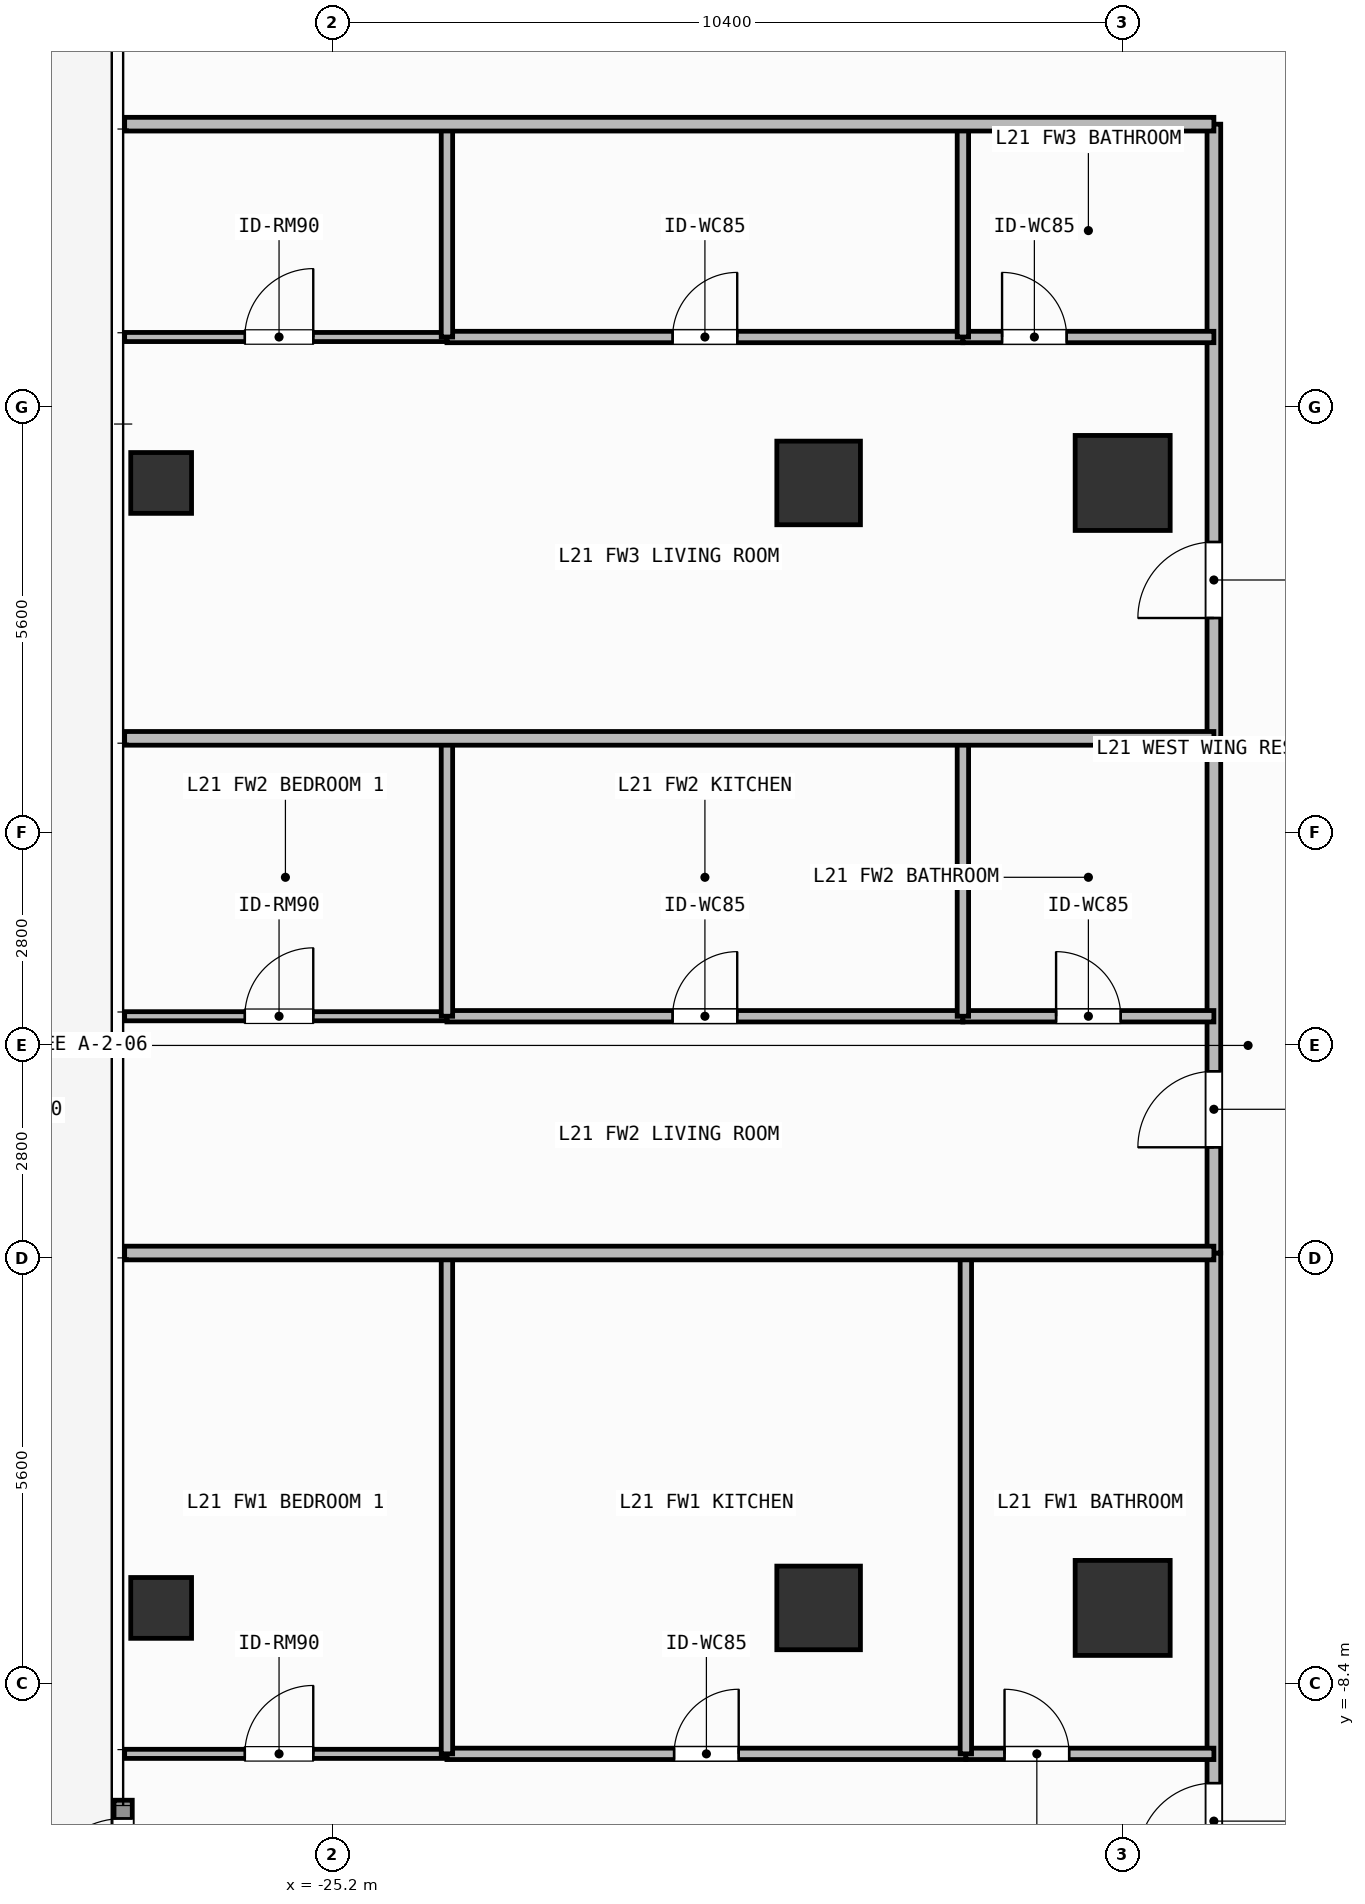
"""IFC4 building model, lengths in metres.
Left out: names, types, materials, properties, quantities, classifications, styles, units other than length and angle.
Written with IfcOpenShell. Run it as: python <this file> out.ifc"""

import sys

from ifc_helpers import new_model, si_unit, direction, frame, frame_2d, origin, origin_2d, place, context, subcontext, project, spatial, rectangle, hollow_rectangle, extrude, element, fill, save


model = new_model("IFC4")
c1 = context("Model", 3, precision=1e-05, world=origin(), true_north=direction((0.0, 1.0)))
c2 = subcontext(c1, "Body", "Model", "MODEL_VIEW")
j1 = project(units=[si_unit("LENGTHUNIT", "METRE"), si_unit("PLANEANGLEUNIT", "RADIAN")], contexts=[c1])
p1 = place(None, origin())
s1 = spatial("IfcSite", under=j1, at=p1, CompositionType="ELEMENT")
p2 = place(p1, origin())
s2 = spatial("IfcBuilding", under=s1, at=p2, CompositionType="ELEMENT")
p3 = place(p2, frame((0.0, 0.0, 85.2)))
s3 = spatial("IfcBuildingStorey", under=s2, at=p3, CompositionType="ELEMENT", Elevation=85.2)
for number, where, z_axis, x_axis in (
    (1, (-14.8, -7.4, 0.0), (0.0, 0.0, 1.0), (1.0, 0.0, 0.0)),
    (2, (-14.8, 7.4, 0.0), (0.0, 0.0, 1.0), (1.0, 0.0, 0.0)),
):
    element("IfcColumn", number, at=place(p3, frame(where, z_axis=z_axis, x_axis=x_axis)), inside=s3, PredefinedType="COLUMN", context=c2, shape_type="SweptSolid", body=[
        extrude(rectangle(XDim=1.25, YDim=1.25, at=origin_2d()), origin(), (0.0, 0.0, 1.0), 3.9),
    ])
for number, where, z_axis, x_axis in (
    (3, (-18.8, -7.4, 0.0), (0.0, 0.0, 1.0), (1.0, 0.0, 0.0)),
    (4, (-18.8, 7.4, 0.0), (0.0, 0.0, 1.0), (1.0, 0.0, 0.0)),
):
    element("IfcColumn", number, at=place(p3, frame(where, z_axis=z_axis, x_axis=x_axis)), inside=s3, PredefinedType="COLUMN", context=c2, shape_type="SweptSolid", body=[
        extrude(rectangle(XDim=1.1, YDim=1.1, at=origin_2d()), origin(), (0.0, 0.0, 1.0), 3.9),
    ])
for number, where, z_axis, x_axis in (
    (5, (-27.45, -7.4, 0.0), (0.0, 0.0, 1.0), (1.0, 0.0, 0.0)),
    (6, (-27.45, 7.4, 0.0), (0.0, 0.0, 1.0), (1.0, 0.0, 0.0)),
):
    element("IfcColumn", number, at=place(p3, frame(where, z_axis=z_axis, x_axis=x_axis)), inside=s3, PredefinedType="COLUMN", context=c2, shape_type="SweptSolid", body=[
        extrude(hollow_rectangle(XDim=0.8, YDim=0.8, WallThickness=0.036, at=origin_2d()), origin(), (0.0, 0.0, 1.0), 3.9),
    ])
p4 = place(p3, frame((-27.95, -11.51, 0.0), z_axis=(0.0, 0.0, 1.0), x_axis=(0.0, 1.0, 0.0)))
e7 = element("IfcWall", 7, at=p4, inside=s3, PredefinedType="SOLIDWALL", context=c2, shape_type="SweptSolid", body=[
    extrude(rectangle(XDim=1.58, YDim=0.24, at=frame_2d((0.79, 0.0))), origin(), (0.0, 0.0, 1.0), 3.68),
])
p5 = place(p4, frame((0.24, 0.0, 0.0)))
e8 = element("IfcOpeningElement", 8, at=p5, cuts=e7, PredefinedType="OPENING", context=c2, shape_type="SweptSolid", body=[
    extrude(rectangle(XDim=1.1, YDim=2.2, at=frame_2d((0.55, 1.1))), frame((0.0, 0.13, 0.0), z_axis=(0.0, -1.0, 0.0), x_axis=(1.0, 0.0, 0.0)), (0.0, 0.0, 1.0), 0.26),
])
p6 = place(p3, frame((-13.6, -12.12, 0.0), z_axis=(0.0, 0.0, 1.0), x_axis=(0.0, 1.0, 0.0)))
e9 = element("IfcWall", 9, at=p6, inside=s3, PredefinedType="PARTITIONING", context=c2, shape_type="SweptSolid", body=[
    extrude(rectangle(XDim=9.389, YDim=0.18, at=frame_2d((4.695, 0.0))), origin(), (0.0, 0.0, 1.0), 3.68),
])
p7 = place(p6, frame((1.415, 0.0, 0.0)))
e10 = element("IfcOpeningElement", 10, at=p7, cuts=e9, PredefinedType="OPENING", context=c2, shape_type="SweptSolid", body=[
    extrude(rectangle(XDim=1.0, YDim=2.2, at=frame_2d((0.5, 1.1))), frame((0.0, 0.1, 0.0), z_axis=(0.0, -1.0, 0.0), x_axis=(1.0, 0.0, 0.0)), (0.0, 0.0, 1.0), 0.2),
])
p8 = place(p3, frame((-23.69, -9.32, 0.0), z_axis=(0.0, 0.0, 1.0), x_axis=(1.0, 0.0, 0.0)))
e11 = element("IfcWall", 11, at=p8, inside=s3, PredefinedType="PARTITIONING", context=c2, shape_type="SweptSolid", body=[
    extrude(rectangle(XDim=6.827, YDim=0.15, at=frame_2d((3.414, 0.0))), origin(), (0.0, 0.0, 1.0), 3.68),
])
p9 = place(p8, frame((2.989, 0.0, 0.0)))
e12 = element("IfcOpeningElement", 12, at=p9, cuts=e11, PredefinedType="OPENING", context=c2, shape_type="SweptSolid", body=[
    extrude(rectangle(XDim=0.85, YDim=2.1, at=frame_2d((0.425, 1.05))), frame((0.0, 0.085, 0.0), z_axis=(0.0, -1.0, 0.0), x_axis=(1.0, 0.0, 0.0)), (0.0, 0.0, 1.0), 0.17),
])
p10 = place(p3, frame((-16.863, -9.32, 0.0), z_axis=(0.0, 0.0, 1.0), x_axis=(1.0, 0.0, 0.0)))
e13 = element("IfcWall", 13, at=p10, inside=s3, PredefinedType="PARTITIONING", context=c2, shape_type="SweptSolid", body=[
    extrude(rectangle(XDim=3.263, YDim=0.15, at=frame_2d((1.631, 0.0))), origin(), (0.0, 0.0, 1.0), 3.68),
])
p11 = place(p10, frame((0.509, 0.0, 0.0)))
e14 = element("IfcOpeningElement", 14, at=p11, cuts=e13, PredefinedType="OPENING", context=c2, shape_type="SweptSolid", body=[
    extrude(rectangle(XDim=0.85, YDim=2.1, at=frame_2d((0.425, 1.05))), frame((0.0, 0.085, 0.0), z_axis=(0.0, -1.0, 0.0), x_axis=(1.0, 0.0, 0.0)), (0.0, 0.0, 1.0), 0.17),
])
p12 = place(p3, frame((-27.93, -9.32, 0.0), z_axis=(0.0, 0.0, 1.0), x_axis=(1.0, 0.0, 0.0)))
e15 = element("IfcWall", 15, at=p12, inside=s3, PredefinedType="PARTITIONING", context=c2, shape_type="SweptSolid", body=[
    extrude(rectangle(XDim=4.24, YDim=0.12, at=frame_2d((2.12, 0.0))), origin(), (0.0, 0.0, 1.0), 3.68),
])
p13 = place(p12, frame((1.581, 0.0, 0.0)))
e16 = element("IfcOpeningElement", 16, at=p13, cuts=e15, PredefinedType="OPENING", context=c2, shape_type="SweptSolid", body=[
    extrude(rectangle(XDim=0.9, YDim=2.1, at=frame_2d((0.45, 1.05))), frame((0.0, 0.07, 0.0), z_axis=(0.0, -1.0, 0.0), x_axis=(1.0, 0.0, 0.0)), (0.0, 0.0, 1.0), 0.14),
])
p14 = place(p3, frame((-13.6, -2.731, 0.0), z_axis=(0.0, 0.0, 1.0), x_axis=(0.0, 1.0, 0.0)))
e17 = element("IfcWall", 17, at=p14, inside=s3, PredefinedType="PARTITIONING", context=c2, shape_type="SweptSolid", body=[
    extrude(rectangle(XDim=6.771, YDim=0.18, at=frame_2d((3.385, 0.0))), origin(), (0.0, 0.0, 1.0), 3.68),
])
p15 = place(p14, frame((1.391, 0.0, 0.0)))
e18 = element("IfcOpeningElement", 18, at=p15, cuts=e17, PredefinedType="OPENING", context=c2, shape_type="SweptSolid", body=[
    extrude(rectangle(XDim=1.0, YDim=2.2, at=frame_2d((0.5, 1.1))), frame((0.0, 0.1, 0.0), z_axis=(0.0, -1.0, 0.0), x_axis=(1.0, 0.0, 0.0)), (0.0, 0.0, 1.0), 0.2),
])
p16 = place(p3, frame((-23.69, 0.384, 0.0), z_axis=(0.0, 0.0, 1.0), x_axis=(1.0, 0.0, 0.0)))
e19 = element("IfcWall", 19, at=p16, inside=s3, PredefinedType="PARTITIONING", context=c2, shape_type="SweptSolid", body=[
    extrude(rectangle(XDim=6.788, YDim=0.15, at=frame_2d((3.394, 0.0))), origin(), (0.0, 0.0, 1.0), 3.68),
])
p17 = place(p16, frame((2.969, 0.0, 0.0)))
e20 = element("IfcOpeningElement", 20, at=p17, cuts=e19, PredefinedType="OPENING", context=c2, shape_type="SweptSolid", body=[
    extrude(rectangle(XDim=0.85, YDim=2.1, at=frame_2d((0.425, 1.05))), frame((0.0, 0.085, 0.0), z_axis=(0.0, -1.0, 0.0), x_axis=(1.0, 0.0, 0.0)), (0.0, 0.0, 1.0), 0.17),
])
p18 = place(p3, frame((-16.902, 0.384, 0.0), z_axis=(0.0, 0.0, 1.0), x_axis=(1.0, 0.0, 0.0)))
e21 = element("IfcWall", 21, at=p18, inside=s3, PredefinedType="PARTITIONING", context=c2, shape_type="SweptSolid", body=[
    extrude(rectangle(XDim=3.302, YDim=0.15, at=frame_2d((1.651, 0.0))), origin(), (0.0, 0.0, 1.0), 3.68),
])
p19 = place(p18, frame((1.226, 0.0, 0.0)))
e22 = element("IfcOpeningElement", 22, at=p19, cuts=e21, PredefinedType="OPENING", context=c2, shape_type="SweptSolid", body=[
    extrude(rectangle(XDim=0.85, YDim=2.1, at=frame_2d((0.425, 1.05))), frame((0.0, 0.085, 0.0), z_axis=(0.0, -1.0, 0.0), x_axis=(1.0, 0.0, 0.0)), (0.0, 0.0, 1.0), 0.17),
])
p20 = place(p3, frame((-27.93, 0.384, 0.0), z_axis=(0.0, 0.0, 1.0), x_axis=(1.0, 0.0, 0.0)))
e23 = element("IfcWall", 23, at=p20, inside=s3, PredefinedType="PARTITIONING", context=c2, shape_type="SweptSolid", body=[
    extrude(rectangle(XDim=4.24, YDim=0.12, at=frame_2d((2.12, 0.0))), origin(), (0.0, 0.0, 1.0), 3.68),
])
p21 = place(p20, frame((1.581, 0.0, 0.0)))
e24 = element("IfcOpeningElement", 24, at=p21, cuts=e23, PredefinedType="OPENING", context=c2, shape_type="SweptSolid", body=[
    extrude(rectangle(XDim=0.9, YDim=2.1, at=frame_2d((0.45, 1.05))), frame((0.0, 0.07, 0.0), z_axis=(0.0, -1.0, 0.0), x_axis=(1.0, 0.0, 0.0)), (0.0, 0.0, 1.0), 0.14),
])
p22 = place(p3, frame((-13.6, 4.04, 0.0), z_axis=(0.0, 0.0, 1.0), x_axis=(0.0, 1.0, 0.0)))
e25 = element("IfcWall", 25, at=p22, inside=s3, PredefinedType="PARTITIONING", context=c2, shape_type="SweptSolid", body=[
    extrude(rectangle(XDim=8.08, YDim=0.18, at=frame_2d((4.04, 0.0))), origin(), (0.0, 0.0, 1.0), 3.68),
])
p23 = place(p22, frame((1.583, 0.0, 0.0)))
e26 = element("IfcOpeningElement", 26, at=p23, cuts=e25, PredefinedType="OPENING", context=c2, shape_type="SweptSolid", body=[
    extrude(rectangle(XDim=1.0, YDim=2.2, at=frame_2d((0.5, 1.1))), frame((0.0, 0.1, 0.0), z_axis=(0.0, -1.0, 0.0), x_axis=(1.0, 0.0, 0.0)), (0.0, 0.0, 1.0), 0.2),
])
p24 = place(p3, frame((-23.69, 9.32, 0.0), z_axis=(0.0, 0.0, 1.0), x_axis=(1.0, 0.0, 0.0)))
e27 = element("IfcWall", 27, at=p24, inside=s3, PredefinedType="PARTITIONING", context=c2, shape_type="SweptSolid", body=[
    extrude(rectangle(XDim=6.788, YDim=0.15, at=frame_2d((3.394, 0.0))), origin(), (0.0, 0.0, 1.0), 3.68),
])
p25 = place(p24, frame((2.969, 0.0, 0.0)))
e28 = element("IfcOpeningElement", 28, at=p25, cuts=e27, PredefinedType="OPENING", context=c2, shape_type="SweptSolid", body=[
    extrude(rectangle(XDim=0.85, YDim=2.1, at=frame_2d((0.425, 1.05))), frame((0.0, 0.085, 0.0), z_axis=(0.0, -1.0, 0.0), x_axis=(1.0, 0.0, 0.0)), (0.0, 0.0, 1.0), 0.17),
])
p26 = place(p3, frame((-16.902, 9.32, 0.0), z_axis=(0.0, 0.0, 1.0), x_axis=(1.0, 0.0, 0.0)))
e29 = element("IfcWall", 29, at=p26, inside=s3, PredefinedType="PARTITIONING", context=c2, shape_type="SweptSolid", body=[
    extrude(rectangle(XDim=3.302, YDim=0.15, at=frame_2d((1.651, 0.0))), origin(), (0.0, 0.0, 1.0), 3.68),
])
p27 = place(p26, frame((0.515, 0.0, 0.0)))
e30 = element("IfcOpeningElement", 30, at=p27, cuts=e29, PredefinedType="OPENING", context=c2, shape_type="SweptSolid", body=[
    extrude(rectangle(XDim=0.85, YDim=2.1, at=frame_2d((0.425, 1.05))), frame((0.0, 0.085, 0.0), z_axis=(0.0, -1.0, 0.0), x_axis=(1.0, 0.0, 0.0)), (0.0, 0.0, 1.0), 0.17),
])
p28 = place(p3, frame((-27.93, 9.32, 0.0), z_axis=(0.0, 0.0, 1.0), x_axis=(1.0, 0.0, 0.0)))
e31 = element("IfcWall", 31, at=p28, inside=s3, PredefinedType="PARTITIONING", context=c2, shape_type="SweptSolid", body=[
    extrude(rectangle(XDim=4.24, YDim=0.12, at=frame_2d((2.12, 0.0))), origin(), (0.0, 0.0, 1.0), 3.68),
])
p29 = place(p28, frame((1.581, 0.0, 0.0)))
e32 = element("IfcOpeningElement", 32, at=p29, cuts=e31, PredefinedType="OPENING", context=c2, shape_type="SweptSolid", body=[
    extrude(rectangle(XDim=0.9, YDim=2.1, at=frame_2d((0.45, 1.05))), frame((0.0, 0.07, 0.0), z_axis=(0.0, -1.0, 0.0), x_axis=(1.0, 0.0, 0.0)), (0.0, 0.0, 1.0), 0.14),
])
for number, where, z_axis, x_axis in (
    (33, (-16.863, -9.32, 0.0), (0.0, 0.0, 1.0), (0.0, 1.0, 0.0)),
    (34, (-23.69, -9.32, 0.0), (0.0, 0.0, 1.0), (0.0, 1.0, 0.0)),
):
    element("IfcWall", number, at=place(p3, frame(where, z_axis=z_axis, x_axis=x_axis)), inside=s3, PredefinedType="PARTITIONING", context=c2, shape_type="SweptSolid", body=[
        extrude(rectangle(XDim=6.589, YDim=0.15, at=frame_2d((3.294, 0.0))), origin(), (0.0, 0.0, 1.0), 3.68),
    ])
for number, where, z_axis, x_axis in (
    (35, (-16.902, 0.384, 0.0), (0.0, 0.0, 1.0), (0.0, 1.0, 0.0)),
    (36, (-23.69, 0.384, 0.0), (0.0, 0.0, 1.0), (0.0, 1.0, 0.0)),
):
    element("IfcWall", number, at=place(p3, frame(where, z_axis=z_axis, x_axis=x_axis)), inside=s3, PredefinedType="PARTITIONING", context=c2, shape_type="SweptSolid", body=[
        extrude(rectangle(XDim=3.656, YDim=0.15, at=frame_2d((1.828, 0.0))), origin(), (0.0, 0.0, 1.0), 3.68),
    ])
p30 = place(p3, frame((-27.93, -2.731, 0.0), z_axis=(0.0, 0.0, 1.0), x_axis=(1.0, 0.0, 0.0)))
e37 = element("IfcWall", 37, at=p30, inside=s3, PredefinedType="PARTITIONING", context=c2, shape_type="SweptSolid", body=[
    extrude(rectangle(XDim=14.33, YDim=0.18, at=frame_2d((7.165, 0.0))), origin(), (0.0, 0.0, 1.0), 3.68),
])
for number, where, z_axis, x_axis in (
    (38, (-16.902, 9.32, 0.0), (0.0, 0.0, 1.0), (0.0, 1.0, 0.0)),
    (39, (-23.69, 9.32, 0.0), (0.0, 0.0, 1.0), (0.0, 1.0, 0.0)),
):
    element("IfcWall", number, at=place(p3, frame(where, z_axis=z_axis, x_axis=x_axis)), inside=s3, PredefinedType="PARTITIONING", context=c2, shape_type="SweptSolid", body=[
        extrude(rectangle(XDim=2.8, YDim=0.15, at=frame_2d((1.4, 0.0))), origin(), (0.0, 0.0, 1.0), 3.68),
    ])
for number, where, z_axis, x_axis in (
    (40, (-27.93, 4.04, 0.0), (0.0, 0.0, 1.0), (1.0, 0.0, 0.0)),
    (41, (-27.93, 12.12, 0.0), (0.0, 0.0, 1.0), (1.0, 0.0, 0.0)),
):
    element("IfcWall", number, at=place(p3, frame(where, z_axis=z_axis, x_axis=x_axis)), inside=s3, PredefinedType="PARTITIONING", context=c2, shape_type="SweptSolid", body=[
        extrude(rectangle(XDim=14.33, YDim=0.18, at=frame_2d((7.165, 0.0))), origin(), (0.0, 0.0, 1.0), 3.68),
    ])
p31 = place(p5, origin())
e42 = element("IfcDoor", 42, at=p31, inside=s3, OperationType="SINGLE_SWING_LEFT", PredefinedType="DOOR", context=c2, shape_type="SweptSolid", body=[
    extrude(rectangle(XDim=1.1, YDim=2.2, at=frame_2d((0.55, 1.1))), frame((0.0, 0.025, 0.0), z_axis=(0.0, -1.0, 0.0), x_axis=(1.0, 0.0, 0.0)), (0.0, 0.0, 1.0), 0.05),
])
fill(e8, e42)
p32 = place(p7, origin())
e43 = element("IfcDoor", 43, at=p32, inside=s3, OperationType="SINGLE_SWING_LEFT", PredefinedType="DOOR", context=c2, shape_type="SweptSolid", body=[
    extrude(rectangle(XDim=1.0, YDim=2.2, at=frame_2d((0.5, 1.1))), frame((0.0, 0.025, 0.0), z_axis=(0.0, -1.0, 0.0), x_axis=(1.0, 0.0, 0.0)), (0.0, 0.0, 1.0), 0.05),
])
fill(e10, e43)
p33 = place(p9, origin())
e44 = element("IfcDoor", 44, at=p33, inside=s3, OperationType="SINGLE_SWING_RIGHT", PredefinedType="DOOR", context=c2, shape_type="SweptSolid", body=[
    extrude(rectangle(XDim=0.85, YDim=2.1, at=frame_2d((0.425, 1.05))), frame((0.0, 0.025, 0.0), z_axis=(0.0, -1.0, 0.0), x_axis=(1.0, 0.0, 0.0)), (0.0, 0.0, 1.0), 0.05),
])
fill(e12, e44)
p34 = place(p11, origin())
e45 = element("IfcDoor", 45, at=p34, inside=s3, OperationType="SINGLE_SWING_LEFT", PredefinedType="DOOR", context=c2, shape_type="SweptSolid", body=[
    extrude(rectangle(XDim=0.85, YDim=2.1, at=frame_2d((0.425, 1.05))), frame((0.0, 0.025, 0.0), z_axis=(0.0, -1.0, 0.0), x_axis=(1.0, 0.0, 0.0)), (0.0, 0.0, 1.0), 0.05),
])
fill(e14, e45)
p35 = place(p13, origin())
e46 = element("IfcDoor", 46, at=p35, inside=s3, OperationType="SINGLE_SWING_RIGHT", PredefinedType="DOOR", context=c2, shape_type="SweptSolid", body=[
    extrude(rectangle(XDim=0.9, YDim=2.1, at=frame_2d((0.45, 1.05))), frame((0.0, 0.025, 0.0), z_axis=(0.0, -1.0, 0.0), x_axis=(1.0, 0.0, 0.0)), (0.0, 0.0, 1.0), 0.05),
])
fill(e16, e46)
p36 = place(p15, origin())
e47 = element("IfcDoor", 47, at=p36, inside=s3, OperationType="SINGLE_SWING_LEFT", PredefinedType="DOOR", context=c2, shape_type="SweptSolid", body=[
    extrude(rectangle(XDim=1.0, YDim=2.2, at=frame_2d((0.5, 1.1))), frame((0.0, 0.025, 0.0), z_axis=(0.0, -1.0, 0.0), x_axis=(1.0, 0.0, 0.0)), (0.0, 0.0, 1.0), 0.05),
])
fill(e18, e47)
p37 = place(p17, origin())
e48 = element("IfcDoor", 48, at=p37, inside=s3, OperationType="SINGLE_SWING_RIGHT", PredefinedType="DOOR", context=c2, shape_type="SweptSolid", body=[
    extrude(rectangle(XDim=0.85, YDim=2.1, at=frame_2d((0.425, 1.05))), frame((0.0, 0.025, 0.0), z_axis=(0.0, -1.0, 0.0), x_axis=(1.0, 0.0, 0.0)), (0.0, 0.0, 1.0), 0.05),
])
fill(e20, e48)
p38 = place(p19, origin())
e49 = element("IfcDoor", 49, at=p38, inside=s3, OperationType="SINGLE_SWING_LEFT", PredefinedType="DOOR", context=c2, shape_type="SweptSolid", body=[
    extrude(rectangle(XDim=0.85, YDim=2.1, at=frame_2d((0.425, 1.05))), frame((0.0, 0.025, 0.0), z_axis=(0.0, -1.0, 0.0), x_axis=(1.0, 0.0, 0.0)), (0.0, 0.0, 1.0), 0.05),
])
fill(e22, e49)
p39 = place(p21, origin())
e50 = element("IfcDoor", 50, at=p39, inside=s3, OperationType="SINGLE_SWING_RIGHT", PredefinedType="DOOR", context=c2, shape_type="SweptSolid", body=[
    extrude(rectangle(XDim=0.9, YDim=2.1, at=frame_2d((0.45, 1.05))), frame((0.0, 0.025, 0.0), z_axis=(0.0, -1.0, 0.0), x_axis=(1.0, 0.0, 0.0)), (0.0, 0.0, 1.0), 0.05),
])
fill(e24, e50)
p40 = place(p23, origin())
e51 = element("IfcDoor", 51, at=p40, inside=s3, OperationType="SINGLE_SWING_LEFT", PredefinedType="DOOR", context=c2, shape_type="SweptSolid", body=[
    extrude(rectangle(XDim=1.0, YDim=2.2, at=frame_2d((0.5, 1.1))), frame((0.0, 0.025, 0.0), z_axis=(0.0, -1.0, 0.0), x_axis=(1.0, 0.0, 0.0)), (0.0, 0.0, 1.0), 0.05),
])
fill(e26, e51)
p41 = place(p25, origin())
e52 = element("IfcDoor", 52, at=p41, inside=s3, OperationType="SINGLE_SWING_RIGHT", PredefinedType="DOOR", context=c2, shape_type="SweptSolid", body=[
    extrude(rectangle(XDim=0.85, YDim=2.1, at=frame_2d((0.425, 1.05))), frame((0.0, 0.025, 0.0), z_axis=(0.0, -1.0, 0.0), x_axis=(1.0, 0.0, 0.0)), (0.0, 0.0, 1.0), 0.05),
])
fill(e28, e52)
p42 = place(p27, origin())
e53 = element("IfcDoor", 53, at=p42, inside=s3, OperationType="SINGLE_SWING_LEFT", PredefinedType="DOOR", context=c2, shape_type="SweptSolid", body=[
    extrude(rectangle(XDim=0.85, YDim=2.1, at=frame_2d((0.425, 1.05))), frame((0.0, 0.025, 0.0), z_axis=(0.0, -1.0, 0.0), x_axis=(1.0, 0.0, 0.0)), (0.0, 0.0, 1.0), 0.05),
])
fill(e30, e53)
p43 = place(p29, origin())
e54 = element("IfcDoor", 54, at=p43, inside=s3, OperationType="SINGLE_SWING_RIGHT", PredefinedType="DOOR", context=c2, shape_type="SweptSolid", body=[
    extrude(rectangle(XDim=0.9, YDim=2.1, at=frame_2d((0.45, 1.05))), frame((0.0, 0.025, 0.0), z_axis=(0.0, -1.0, 0.0), x_axis=(1.0, 0.0, 0.0)), (0.0, 0.0, 1.0), 0.05),
])
fill(e32, e54)
save(model, sys.argv[1])
